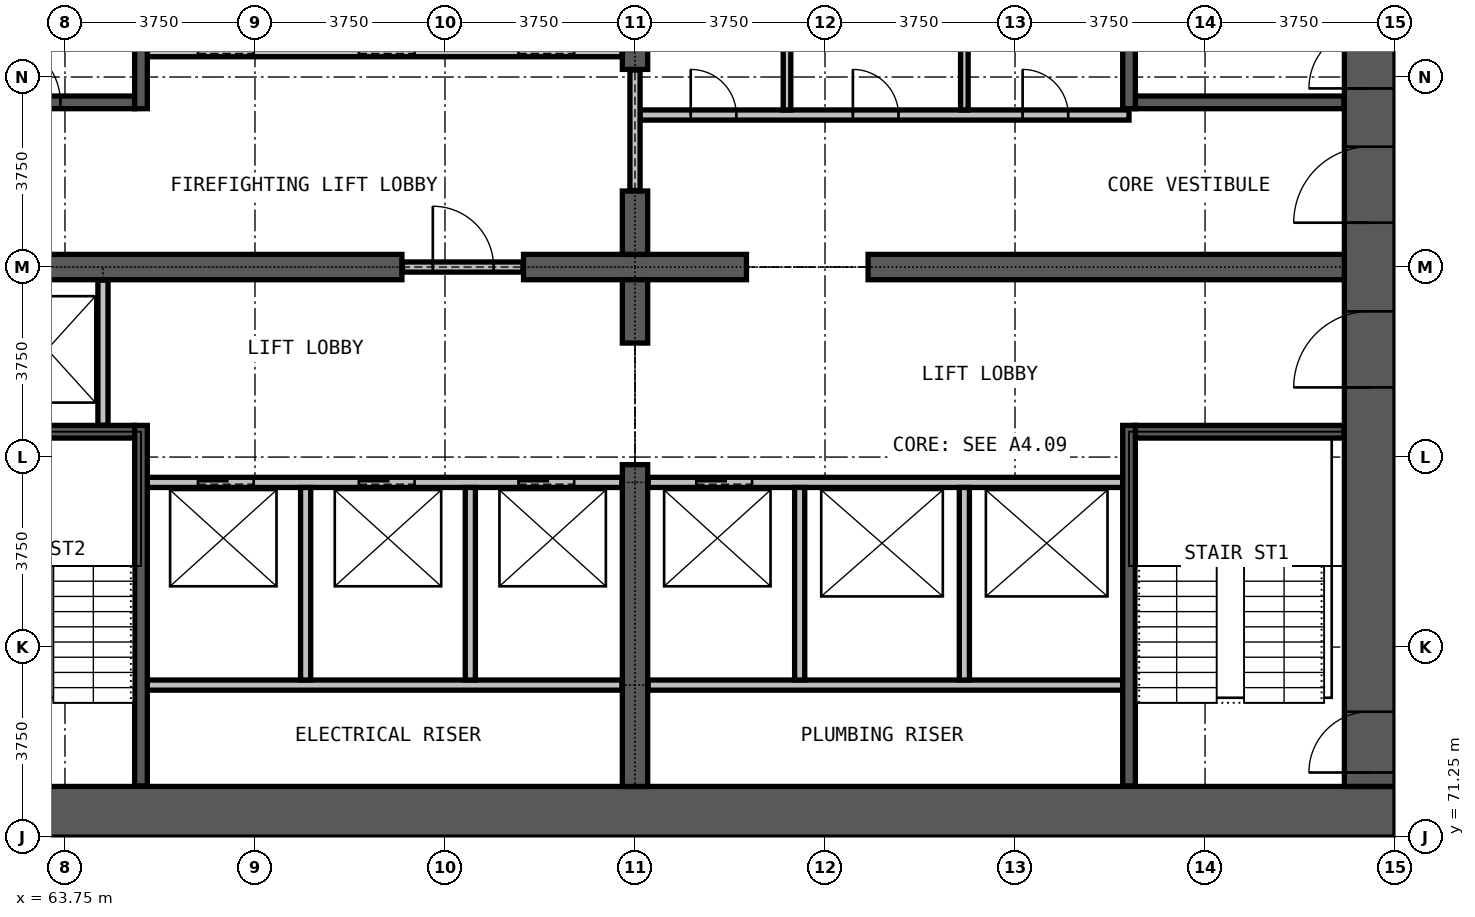
"""IFC4 building model, lengths in metres.
Left out: names, types, materials, properties, quantities, classifications, styles, units other than length and angle.
Written with IfcOpenShell. Run it as: python <this file> out.ifc"""

import sys

from ifc_helpers import new_model, si_unit, direction, frame, frame_2d, origin, place, context, subcontext, project, spatial, rectangle, extrude, element, fill, save


model = new_model("IFC4")
c1 = context("Model", 3, precision=1e-05, world=origin(), true_north=direction((0.0, 1.0)))
c2 = subcontext(c1, "Body", "Model", "MODEL_VIEW")
j1 = project(units=[si_unit("LENGTHUNIT", "METRE"), si_unit("PLANEANGLEUNIT", "RADIAN")], contexts=[c1])
p1 = place(None, origin())
s1 = spatial("IfcSite", under=j1, at=p1, CompositionType="ELEMENT")
p2 = place(p1, origin())
s2 = spatial("IfcBuilding", under=s1, at=p2, CompositionType="ELEMENT")
p3 = place(p2, frame((0.0, 0.0, 95.6)))
s3 = spatial("IfcBuildingStorey", under=s2, at=p3, CompositionType="ELEMENT", Elevation=95.6)
p4 = place(p3, frame((60.0, 71.75, 0.0), z_axis=(0.0, 0.0, 1.0), x_axis=(1.0, 0.0, 0.0)))
e1 = element("IfcWall", 1, at=p4, inside=s3, PredefinedType="SHEAR", context=c2, shape_type="SweptSolid", body=[
    extrude(rectangle(XDim=30.0, YDim=1.0, at=frame_2d((15.0, 0.0))), origin(), (0.0, 0.0, 1.0), 3.3),
])
p5 = place(p3, frame((89.5, 72.25, 0.0), z_axis=(0.0, 0.0, 1.0), x_axis=(0.0, 1.0, 0.0)))
e2 = element("IfcWall", 2, at=p5, inside=s3, PredefinedType="SHEAR", context=c2, shape_type="SweptSolid", body=[
    extrude(rectangle(XDim=20.5, YDim=1.0, at=frame_2d((10.25, 0.0))), origin(), (0.0, 0.0, 1.0), 3.3),
])
p6 = place(p5, frame((0.275, 0.0, 0.0)))
e3 = element("IfcOpeningElement", 3, at=p6, cuts=e2, PredefinedType="OPENING", context=c2, shape_type="SweptSolid", body=[
    extrude(rectangle(XDim=1.2, YDim=2.2, at=frame_2d((0.6, 1.1))), frame((0.0, 0.51, 0.0), z_axis=(0.0, -1.0, 0.0), x_axis=(1.0, 0.0, 0.0)), (0.0, 0.0, 1.0), 1.02),
])
p7 = place(p5, frame((13.775, 0.0, 0.0)))
e4 = element("IfcOpeningElement", 4, at=p7, cuts=e2, PredefinedType="OPENING", context=c2, shape_type="SweptSolid", body=[
    extrude(rectangle(XDim=1.2, YDim=2.2, at=frame_2d((0.6, 1.1))), frame((0.0, 0.51, 0.0), z_axis=(0.0, -1.0, 0.0), x_axis=(1.0, 0.0, 0.0)), (0.0, 0.0, 1.0), 1.02),
])
p8 = place(p5, frame((7.875, 0.0, 0.0)))
e5 = element("IfcOpeningElement", 5, at=p8, cuts=e2, PredefinedType="OPENING", context=c2, shape_type="SweptSolid", body=[
    extrude(rectangle(XDim=1.5, YDim=2.2, at=frame_2d((0.75, 1.1))), frame((0.0, 0.51, 0.0), z_axis=(0.0, -1.0, 0.0), x_axis=(1.0, 0.0, 0.0)), (0.0, 0.0, 1.0), 1.02),
])
p9 = place(p5, frame((11.125, 0.0, 0.0)))
e6 = element("IfcOpeningElement", 6, at=p9, cuts=e2, PredefinedType="OPENING", context=c2, shape_type="SweptSolid", body=[
    extrude(rectangle(XDim=1.5, YDim=2.2, at=frame_2d((0.75, 1.1))), frame((0.0, 0.51, 0.0), z_axis=(0.0, -1.0, 0.0), x_axis=(1.0, 0.0, 0.0)), (0.0, 0.0, 1.0), 1.02),
])
p10 = place(p3, frame((61.0, 82.5, 0.0), z_axis=(0.0, 0.0, 1.0), x_axis=(1.0, 0.0, 0.0)))
e7 = element("IfcWall", 7, at=p10, inside=s3, PredefinedType="SHEAR", context=c2, shape_type="SweptSolid", body=[
    extrude(rectangle(XDim=9.4, YDim=0.5, at=frame_2d((4.7, 0.0))), origin(), (0.0, 0.0, 1.0), 3.3),
])
p11 = place(p3, frame((72.8, 82.5, 0.0), z_axis=(0.0, 0.0, 1.0), x_axis=(1.0, 0.0, 0.0)))
e8 = element("IfcWall", 8, at=p11, inside=s3, PredefinedType="SHEAR", context=c2, shape_type="SweptSolid", body=[
    extrude(rectangle(XDim=4.4, YDim=0.5, at=frame_2d((2.2, 0.0))), origin(), (0.0, 0.0, 1.0), 3.3),
])
p12 = place(p3, frame((79.6, 82.5, 0.0), z_axis=(0.0, 0.0, 1.0), x_axis=(1.0, 0.0, 0.0)))
e9 = element("IfcWall", 9, at=p12, inside=s3, PredefinedType="SHEAR", context=c2, shape_type="SweptSolid", body=[
    extrude(rectangle(XDim=9.4, YDim=0.5, at=frame_2d((4.7, 0.0))), origin(), (0.0, 0.0, 1.0), 3.3),
])
p13 = place(p3, frame((75.0, 72.25, 0.0), z_axis=(0.0, 0.0, 1.0), x_axis=(0.0, 1.0, 0.0)))
e10 = element("IfcWall", 10, at=p13, inside=s3, PredefinedType="SHEAR", context=c2, shape_type="SweptSolid", body=[
    extrude(rectangle(XDim=6.35, YDim=0.5, at=frame_2d((3.175, 0.0))), origin(), (0.0, 0.0, 1.0), 3.3),
])
for number, where, z_axis, x_axis in (
    (11, (75.0, 81.0, 0.0), (0.0, 0.0, 1.0), (0.0, 1.0, 0.0)),
    (12, (75.0, 82.75, 0.0), (0.0, 0.0, 1.0), (0.0, 1.0, 0.0)),
):
    element("IfcWall", number, at=place(p3, frame(where, z_axis=z_axis, x_axis=x_axis)), inside=s3, PredefinedType="SHEAR", context=c2, shape_type="SweptSolid", body=[
        extrude(rectangle(XDim=1.25, YDim=0.5, at=frame_2d((0.625, 0.0))), origin(), (0.0, 0.0, 1.0), 3.3),
    ])
p14 = place(p3, frame((75.0, 86.4, 0.0), z_axis=(0.0, 0.0, 1.0), x_axis=(0.0, 1.0, 0.0)))
e13 = element("IfcWall", 13, at=p14, inside=s3, PredefinedType="SHEAR", context=c2, shape_type="SweptSolid", body=[
    extrude(rectangle(XDim=6.35, YDim=0.5, at=frame_2d((3.175, 0.0))), origin(), (0.0, 0.0, 1.0), 3.3),
])
p15 = place(p3, frame((70.41, 82.5, 0.0), z_axis=(0.0, 0.0, 1.0), x_axis=(1.0, 0.0, 0.0)))
e14 = element("IfcWall", 14, at=p15, inside=s3, PredefinedType="PARTITIONING", context=c2, shape_type="SweptSolid", body=[
    extrude(rectangle(XDim=2.38, YDim=0.2, at=frame_2d((1.19, 0.0))), origin(), (0.0, 0.0, 1.0), 2.4),
])
p16 = place(p15, frame((0.6, 0.0, 0.0)))
e15 = element("IfcOpeningElement", 15, at=p16, cuts=e14, PredefinedType="OPENING", context=c2, shape_type="SweptSolid", body=[
    extrude(rectangle(XDim=1.2, YDim=2.2, at=frame_2d((0.6, 1.1))), frame((0.0, 0.11, 0.0), z_axis=(0.0, -1.0, 0.0), x_axis=(1.0, 0.0, 0.0)), (0.0, 0.0, 1.0), 0.22),
])
p17 = place(p3, frame((75.1, 85.5, 0.0), z_axis=(0.0, 0.0, 1.0), x_axis=(1.0, 0.0, 0.0)))
e16 = element("IfcWall", 16, at=p17, inside=s3, PredefinedType="PARTITIONING", context=c2, shape_type="SweptSolid", body=[
    extrude(rectangle(XDim=9.65, YDim=0.2, at=frame_2d((4.825, 0.0))), origin(), (0.0, 0.0, 1.0), 3.0),
])
p18 = place(p17, frame((1.0, 0.0, 0.0)))
e17 = element("IfcOpeningElement", 17, at=p18, cuts=e16, PredefinedType="OPENING", context=c2, shape_type="SweptSolid", body=[
    extrude(rectangle(XDim=0.9, YDim=2.2, at=frame_2d((0.45, 1.1))), frame((0.0, 0.11, 0.0), z_axis=(0.0, -1.0, 0.0), x_axis=(1.0, 0.0, 0.0)), (0.0, 0.0, 1.0), 0.22),
])
p19 = place(p17, frame((4.2, 0.0, 0.0)))
e18 = element("IfcOpeningElement", 18, at=p19, cuts=e16, PredefinedType="OPENING", context=c2, shape_type="SweptSolid", body=[
    extrude(rectangle(XDim=0.9, YDim=2.2, at=frame_2d((0.45, 1.1))), frame((0.0, 0.11, 0.0), z_axis=(0.0, -1.0, 0.0), x_axis=(1.0, 0.0, 0.0)), (0.0, 0.0, 1.0), 0.22),
])
p20 = place(p17, frame((7.55, 0.0, 0.0)))
e19 = element("IfcOpeningElement", 19, at=p20, cuts=e16, PredefinedType="OPENING", context=c2, shape_type="SweptSolid", body=[
    extrude(rectangle(XDim=0.9, YDim=2.2, at=frame_2d((0.45, 1.1))), frame((0.0, 0.11, 0.0), z_axis=(0.0, -1.0, 0.0), x_axis=(1.0, 0.0, 0.0)), (0.0, 0.0, 1.0), 0.22),
])
p21 = place(p3, frame((75.0, 84.01, 0.0), z_axis=(0.0, 0.0, 1.0), x_axis=(0.0, 1.0, 0.0)))
e20 = element("IfcWall", 20, at=p21, inside=s3, PredefinedType="PARTITIONING", context=c2, shape_type="SweptSolid", body=[
    extrude(rectangle(XDim=2.38, YDim=0.2, at=frame_2d((1.19, 0.0))), origin(), (0.0, 0.0, 1.0), 2.4),
])
for number, where, z_axis, x_axis in (
    (21, (78.0, 85.6, 0.0), (0.0, 0.0, 1.0), (0.0, 1.0, 0.0)),
    (22, (81.5, 85.6, 0.0), (0.0, 0.0, 1.0), (0.0, 1.0, 0.0)),
):
    element("IfcWall", number, at=place(p3, frame(where, z_axis=z_axis, x_axis=x_axis)), inside=s3, PredefinedType="PARTITIONING", context=c2, shape_type="SweptSolid", body=[
        extrude(rectangle(XDim=5.05, YDim=0.15, at=frame_2d((2.525, 0.0))), origin(), (0.0, 0.0, 1.0), 3.0),
    ])
for number, where, z_axis, x_axis in (
    (23, (65.375, 74.25, 0.0), (0.0, 0.0, 1.0), (1.0, 0.0, 0.0)),
    (24, (75.26, 74.25, 0.0), (0.0, 0.0, 1.0), (1.0, 0.0, 0.0)),
):
    element("IfcWall", number, at=place(p3, frame(where, z_axis=z_axis, x_axis=x_axis)), inside=s3, PredefinedType="PARTITIONING", context=c2, shape_type="SweptSolid", body=[
        extrude(rectangle(XDim=9.365, YDim=0.2, at=frame_2d((4.683, 0.0))), origin(), (0.0, 0.0, 1.0), 3.0),
    ])
p22 = place(p3, frame((65.375, 78.25, 0.0), z_axis=(0.0, 0.0, 1.0), x_axis=(1.0, 0.0, 0.0)))
e25 = element("IfcWall", 25, at=p22, inside=s3, PredefinedType="PARTITIONING", context=c2, shape_type="SweptSolid", body=[
    extrude(rectangle(XDim=9.365, YDim=0.2, at=frame_2d((4.683, 0.0))), origin(), (0.0, 0.0, 1.0), 3.0),
])
p23 = place(p22, frame((1.0, 0.0, 0.0)))
e26 = element("IfcOpeningElement", 26, at=p23, cuts=e25, PredefinedType="OPENING", context=c2, shape_type="SweptSolid", body=[
    extrude(rectangle(XDim=1.1, YDim=2.2, at=frame_2d((0.55, 1.1))), frame((0.0, 0.11, 0.0), z_axis=(0.0, -1.0, 0.0), x_axis=(1.0, 0.0, 0.0)), (0.0, 0.0, 1.0), 0.22),
])
p24 = place(p22, frame((4.175, 0.0, 0.0)))
e27 = element("IfcOpeningElement", 27, at=p24, cuts=e25, PredefinedType="OPENING", context=c2, shape_type="SweptSolid", body=[
    extrude(rectangle(XDim=1.1, YDim=2.2, at=frame_2d((0.55, 1.1))), frame((0.0, 0.11, 0.0), z_axis=(0.0, -1.0, 0.0), x_axis=(1.0, 0.0, 0.0)), (0.0, 0.0, 1.0), 0.22),
])
p25 = place(p22, frame((7.325, 0.0, 0.0)))
e28 = element("IfcOpeningElement", 28, at=p25, cuts=e25, PredefinedType="OPENING", context=c2, shape_type="SweptSolid", body=[
    extrude(rectangle(XDim=1.1, YDim=2.2, at=frame_2d((0.55, 1.1))), frame((0.0, 0.11, 0.0), z_axis=(0.0, -1.0, 0.0), x_axis=(1.0, 0.0, 0.0)), (0.0, 0.0, 1.0), 0.22),
])
p26 = place(p3, frame((75.26, 78.25, 0.0), z_axis=(0.0, 0.0, 1.0), x_axis=(1.0, 0.0, 0.0)))
e29 = element("IfcWall", 29, at=p26, inside=s3, PredefinedType="PARTITIONING", context=c2, shape_type="SweptSolid", body=[
    extrude(rectangle(XDim=9.365, YDim=0.2, at=frame_2d((4.683, 0.0))), origin(), (0.0, 0.0, 1.0), 3.0),
])
p27 = place(p26, frame((0.95, 0.0, 0.0)))
e30 = element("IfcOpeningElement", 30, at=p27, cuts=e29, PredefinedType="OPENING", context=c2, shape_type="SweptSolid", body=[
    extrude(rectangle(XDim=1.1, YDim=2.2, at=frame_2d((0.55, 1.1))), frame((0.0, 0.11, 0.0), z_axis=(0.0, -1.0, 0.0), x_axis=(1.0, 0.0, 0.0)), (0.0, 0.0, 1.0), 0.22),
])
p28 = place(p3, frame((65.375, 86.75, 0.0), z_axis=(0.0, 0.0, 1.0), x_axis=(1.0, 0.0, 0.0)))
e31 = element("IfcWall", 31, at=p28, inside=s3, PredefinedType="PARTITIONING", context=c2, shape_type="SweptSolid", body=[
    extrude(rectangle(XDim=9.365, YDim=0.2, at=frame_2d((4.683, 0.0))), origin(), (0.0, 0.0, 1.0), 3.0),
])
p29 = place(p28, frame((1.0, 0.0, 0.0)))
e32 = element("IfcOpeningElement", 32, at=p29, cuts=e31, PredefinedType="OPENING", context=c2, shape_type="SweptSolid", body=[
    extrude(rectangle(XDim=1.1, YDim=2.2, at=frame_2d((0.55, 1.1))), frame((0.0, 0.11, 0.0), z_axis=(0.0, -1.0, 0.0), x_axis=(1.0, 0.0, 0.0)), (0.0, 0.0, 1.0), 0.22),
])
p30 = place(p28, frame((4.175, 0.0, 0.0)))
e33 = element("IfcOpeningElement", 33, at=p30, cuts=e31, PredefinedType="OPENING", context=c2, shape_type="SweptSolid", body=[
    extrude(rectangle(XDim=1.1, YDim=2.2, at=frame_2d((0.55, 1.1))), frame((0.0, 0.11, 0.0), z_axis=(0.0, -1.0, 0.0), x_axis=(1.0, 0.0, 0.0)), (0.0, 0.0, 1.0), 0.22),
])
p31 = place(p28, frame((7.325, 0.0, 0.0)))
e34 = element("IfcOpeningElement", 34, at=p31, cuts=e31, PredefinedType="OPENING", context=c2, shape_type="SweptSolid", body=[
    extrude(rectangle(XDim=1.1, YDim=2.2, at=frame_2d((0.55, 1.1))), frame((0.0, 0.11, 0.0), z_axis=(0.0, -1.0, 0.0), x_axis=(1.0, 0.0, 0.0)), (0.0, 0.0, 1.0), 0.22),
])
p32 = place(p3, frame((64.5, 79.375, 0.0), z_axis=(0.0, 0.0, 1.0), x_axis=(0.0, 1.0, 0.0)))
e35 = element("IfcWall", 35, at=p32, inside=s3, PredefinedType="PARTITIONING", context=c2, shape_type="SweptSolid", body=[
    extrude(rectangle(XDim=2.865, YDim=0.2, at=frame_2d((1.433, 0.0))), origin(), (0.0, 0.0, 1.0), 3.0),
])
for number, where, z_axis, x_axis in (
    (36, (68.5, 74.35, 0.0), (0.0, 0.0, 1.0), (0.0, 1.0, 0.0)),
    (37, (71.75, 74.35, 0.0), (0.0, 0.0, 1.0), (0.0, 1.0, 0.0)),
    (38, (78.25, 74.35, 0.0), (0.0, 0.0, 1.0), (0.0, 1.0, 0.0)),
    (39, (81.5, 74.35, 0.0), (0.0, 0.0, 1.0), (0.0, 1.0, 0.0)),
):
    element("IfcWall", number, at=place(p3, frame(where, z_axis=z_axis, x_axis=x_axis)), inside=s3, PredefinedType="PARTITIONING", context=c2, shape_type="SweptSolid", body=[
        extrude(rectangle(XDim=3.8, YDim=0.2, at=frame_2d((1.9, 0.0))), origin(), (0.0, 0.0, 1.0), 3.0),
    ])
for number, where, z_axis, x_axis in (
    (40, (61.01, 79.25, 0.0), (0.0, 0.0, 1.0), (1.0, 0.0, 0.0)),
    (41, (84.875, 79.25, 0.0), (0.0, 0.0, 1.0), (1.0, 0.0, 0.0)),
):
    element("IfcWall", number, at=place(p3, frame(where, z_axis=z_axis, x_axis=x_axis)), inside=s3, PredefinedType="PARTITIONING", context=c2, shape_type="SweptSolid", body=[
        extrude(rectangle(XDim=4.115, YDim=0.25, at=frame_2d((2.058, 0.0))), origin(), (0.0, 0.0, 1.0), 3.0),
    ])
p33 = place(p3, frame((61.01, 85.75, 0.0), z_axis=(0.0, 0.0, 1.0), x_axis=(1.0, 0.0, 0.0)))
e42 = element("IfcWall", 42, at=p33, inside=s3, PredefinedType="PARTITIONING", context=c2, shape_type="SweptSolid", body=[
    extrude(rectangle(XDim=4.115, YDim=0.25, at=frame_2d((2.058, 0.0))), origin(), (0.0, 0.0, 1.0), 3.0),
])
p34 = place(p33, frame((1.45, 0.0, 0.0)))
e43 = element("IfcOpeningElement", 43, at=p34, cuts=e42, PredefinedType="OPENING", context=c2, shape_type="SweptSolid", body=[
    extrude(rectangle(XDim=1.2, YDim=2.2, at=frame_2d((0.6, 1.1))), frame((0.0, 0.135, 0.0), z_axis=(0.0, -1.0, 0.0), x_axis=(1.0, 0.0, 0.0)), (0.0, 0.0, 1.0), 0.27),
])
p35 = place(p3, frame((84.875, 85.75, 0.0), z_axis=(0.0, 0.0, 1.0), x_axis=(1.0, 0.0, 0.0)))
e44 = element("IfcWall", 44, at=p35, inside=s3, PredefinedType="PARTITIONING", context=c2, shape_type="SweptSolid", body=[
    extrude(rectangle(XDim=4.115, YDim=0.25, at=frame_2d((2.058, 0.0))), origin(), (0.0, 0.0, 1.0), 3.0),
])
for number, where, z_axis, x_axis in (
    (45, (65.25, 72.26, 0.0), (0.0, 0.0, 1.0), (0.0, 1.0, 0.0)),
    (46, (65.25, 85.625, 0.0), (0.0, 0.0, 1.0), (0.0, 1.0, 0.0)),
    (47, (84.75, 72.26, 0.0), (0.0, 0.0, 1.0), (0.0, 1.0, 0.0)),
    (48, (84.75, 85.625, 0.0), (0.0, 0.0, 1.0), (0.0, 1.0, 0.0)),
):
    element("IfcWall", number, at=place(p3, frame(where, z_axis=z_axis, x_axis=x_axis)), inside=s3, PredefinedType="PARTITIONING", context=c2, shape_type="SweptSolid", body=[
        extrude(rectangle(XDim=7.115, YDim=0.25, at=frame_2d((3.558, 0.0))), origin(), (0.0, 0.0, 1.0), 3.0),
    ])
p36 = place(p23, origin())
e49 = element("IfcDoor", 49, at=p36, inside=s3, OperationType="DOUBLE_DOOR_SLIDING", PredefinedType="DOOR", context=c2, shape_type="SweptSolid", body=[
    extrude(rectangle(XDim=1.1, YDim=2.2, at=frame_2d((0.55, 1.1))), frame((0.0, 0.025, 0.0), z_axis=(0.0, -1.0, 0.0), x_axis=(1.0, 0.0, 0.0)), (0.0, 0.0, 1.0), 0.05),
])
fill(e26, e49)
p37 = place(p24, origin())
e50 = element("IfcDoor", 50, at=p37, inside=s3, OperationType="DOUBLE_DOOR_SLIDING", PredefinedType="DOOR", context=c2, shape_type="SweptSolid", body=[
    extrude(rectangle(XDim=1.1, YDim=2.2, at=frame_2d((0.55, 1.1))), frame((0.0, 0.025, 0.0), z_axis=(0.0, -1.0, 0.0), x_axis=(1.0, 0.0, 0.0)), (0.0, 0.0, 1.0), 0.05),
])
fill(e27, e50)
p38 = place(p25, origin())
e51 = element("IfcDoor", 51, at=p38, inside=s3, OperationType="DOUBLE_DOOR_SLIDING", PredefinedType="DOOR", context=c2, shape_type="SweptSolid", body=[
    extrude(rectangle(XDim=1.1, YDim=2.2, at=frame_2d((0.55, 1.1))), frame((0.0, 0.025, 0.0), z_axis=(0.0, -1.0, 0.0), x_axis=(1.0, 0.0, 0.0)), (0.0, 0.0, 1.0), 0.05),
])
fill(e28, e51)
p39 = place(p27, origin())
e52 = element("IfcDoor", 52, at=p39, inside=s3, OperationType="DOUBLE_DOOR_SLIDING", PredefinedType="DOOR", context=c2, shape_type="SweptSolid", body=[
    extrude(rectangle(XDim=1.1, YDim=2.2, at=frame_2d((0.55, 1.1))), frame((0.0, 0.025, 0.0), z_axis=(0.0, -1.0, 0.0), x_axis=(1.0, 0.0, 0.0)), (0.0, 0.0, 1.0), 0.05),
])
fill(e30, e52)
p40 = place(p29, origin())
e53 = element("IfcDoor", 53, at=p40, inside=s3, OperationType="DOUBLE_DOOR_SLIDING", PredefinedType="DOOR", context=c2, shape_type="SweptSolid", body=[
    extrude(rectangle(XDim=1.1, YDim=2.2, at=frame_2d((0.55, 1.1))), frame((0.0, 0.025, 0.0), z_axis=(0.0, -1.0, 0.0), x_axis=(1.0, 0.0, 0.0)), (0.0, 0.0, 1.0), 0.05),
])
fill(e32, e53)
p41 = place(p30, origin())
e54 = element("IfcDoor", 54, at=p41, inside=s3, OperationType="DOUBLE_DOOR_SLIDING", PredefinedType="DOOR", context=c2, shape_type="SweptSolid", body=[
    extrude(rectangle(XDim=1.1, YDim=2.2, at=frame_2d((0.55, 1.1))), frame((0.0, 0.025, 0.0), z_axis=(0.0, -1.0, 0.0), x_axis=(1.0, 0.0, 0.0)), (0.0, 0.0, 1.0), 0.05),
])
fill(e33, e54)
p42 = place(p31, origin())
e55 = element("IfcDoor", 55, at=p42, inside=s3, OperationType="DOUBLE_DOOR_SLIDING", PredefinedType="DOOR", context=c2, shape_type="SweptSolid", body=[
    extrude(rectangle(XDim=1.1, YDim=2.2, at=frame_2d((0.55, 1.1))), frame((0.0, 0.025, 0.0), z_axis=(0.0, -1.0, 0.0), x_axis=(1.0, 0.0, 0.0)), (0.0, 0.0, 1.0), 0.05),
])
fill(e34, e55)
p43 = place(p16, origin())
e56 = element("IfcDoor", 56, at=p43, inside=s3, OperationType="SINGLE_SWING_LEFT", PredefinedType="DOOR", context=c2, shape_type="SweptSolid", body=[
    extrude(rectangle(XDim=1.2, YDim=2.2, at=frame_2d((0.6, 1.1))), frame((0.0, 0.025, 0.0), z_axis=(0.0, -1.0, 0.0), x_axis=(1.0, 0.0, 0.0)), (0.0, 0.0, 1.0), 0.05),
])
fill(e15, e56)
p44 = place(p34, origin())
e57 = element("IfcDoor", 57, at=p44, inside=s3, OperationType="SINGLE_SWING_LEFT", PredefinedType="DOOR", context=c2, shape_type="SweptSolid", body=[
    extrude(rectangle(XDim=1.2, YDim=2.2, at=frame_2d((0.6, 1.1))), frame((0.0, 0.025, 0.0), z_axis=(0.0, -1.0, 0.0), x_axis=(1.0, 0.0, 0.0)), (0.0, 0.0, 1.0), 0.05),
])
fill(e43, e57)
p45 = place(p6, origin())
e58 = element("IfcDoor", 58, at=p45, inside=s3, OperationType="SINGLE_SWING_LEFT", PredefinedType="DOOR", context=c2, shape_type="SweptSolid", body=[
    extrude(rectangle(XDim=1.2, YDim=2.2, at=frame_2d((0.6, 1.1))), frame((0.0, 0.025, 0.0), z_axis=(0.0, -1.0, 0.0), x_axis=(1.0, 0.0, 0.0)), (0.0, 0.0, 1.0), 0.05),
])
fill(e3, e58)
p46 = place(p7, origin())
e59 = element("IfcDoor", 59, at=p46, inside=s3, OperationType="SINGLE_SWING_RIGHT", PredefinedType="DOOR", context=c2, shape_type="SweptSolid", body=[
    extrude(rectangle(XDim=1.2, YDim=2.2, at=frame_2d((0.6, 1.1))), frame((0.0, 0.025, 0.0), z_axis=(0.0, -1.0, 0.0), x_axis=(1.0, 0.0, 0.0)), (0.0, 0.0, 1.0), 0.05),
])
fill(e4, e59)
p47 = place(p8, origin())
e60 = element("IfcDoor", 60, at=p47, inside=s3, OperationType="DOUBLE_DOOR_SINGLE_SWING", PredefinedType="DOOR", context=c2, shape_type="SweptSolid", body=[
    extrude(rectangle(XDim=1.5, YDim=2.2, at=frame_2d((0.75, 1.1))), frame((0.0, 0.025, 0.0), z_axis=(0.0, -1.0, 0.0), x_axis=(1.0, 0.0, 0.0)), (0.0, 0.0, 1.0), 0.05),
])
fill(e5, e60)
p48 = place(p9, origin())
e61 = element("IfcDoor", 61, at=p48, inside=s3, OperationType="DOUBLE_DOOR_SINGLE_SWING", PredefinedType="DOOR", context=c2, shape_type="SweptSolid", body=[
    extrude(rectangle(XDim=1.5, YDim=2.2, at=frame_2d((0.75, 1.1))), frame((0.0, 0.025, 0.0), z_axis=(0.0, -1.0, 0.0), x_axis=(1.0, 0.0, 0.0)), (0.0, 0.0, 1.0), 0.05),
])
fill(e6, e61)
p49 = place(p18, origin())
e62 = element("IfcDoor", 62, at=p49, inside=s3, OperationType="SINGLE_SWING_LEFT", PredefinedType="DOOR", context=c2, shape_type="SweptSolid", body=[
    extrude(rectangle(XDim=0.9, YDim=2.2, at=frame_2d((0.45, 1.1))), frame((0.0, 0.025, 0.0), z_axis=(0.0, -1.0, 0.0), x_axis=(1.0, 0.0, 0.0)), (0.0, 0.0, 1.0), 0.05),
])
fill(e17, e62)
p50 = place(p19, origin())
e63 = element("IfcDoor", 63, at=p50, inside=s3, OperationType="SINGLE_SWING_RIGHT", PredefinedType="DOOR", context=c2, shape_type="SweptSolid", body=[
    extrude(rectangle(XDim=0.9, YDim=2.2, at=frame_2d((0.45, 1.1))), frame((0.0, 0.025, 0.0), z_axis=(0.0, -1.0, 0.0), x_axis=(1.0, 0.0, 0.0)), (0.0, 0.0, 1.0), 0.05),
])
fill(e18, e63)
p51 = place(p20, origin())
e64 = element("IfcDoor", 64, at=p51, inside=s3, OperationType="SINGLE_SWING_LEFT", PredefinedType="DOOR", context=c2, shape_type="SweptSolid", body=[
    extrude(rectangle(XDim=0.9, YDim=2.2, at=frame_2d((0.45, 1.1))), frame((0.0, 0.025, 0.0), z_axis=(0.0, -1.0, 0.0), x_axis=(1.0, 0.0, 0.0)), (0.0, 0.0, 1.0), 0.05),
])
fill(e19, e64)
save(model, sys.argv[1])
